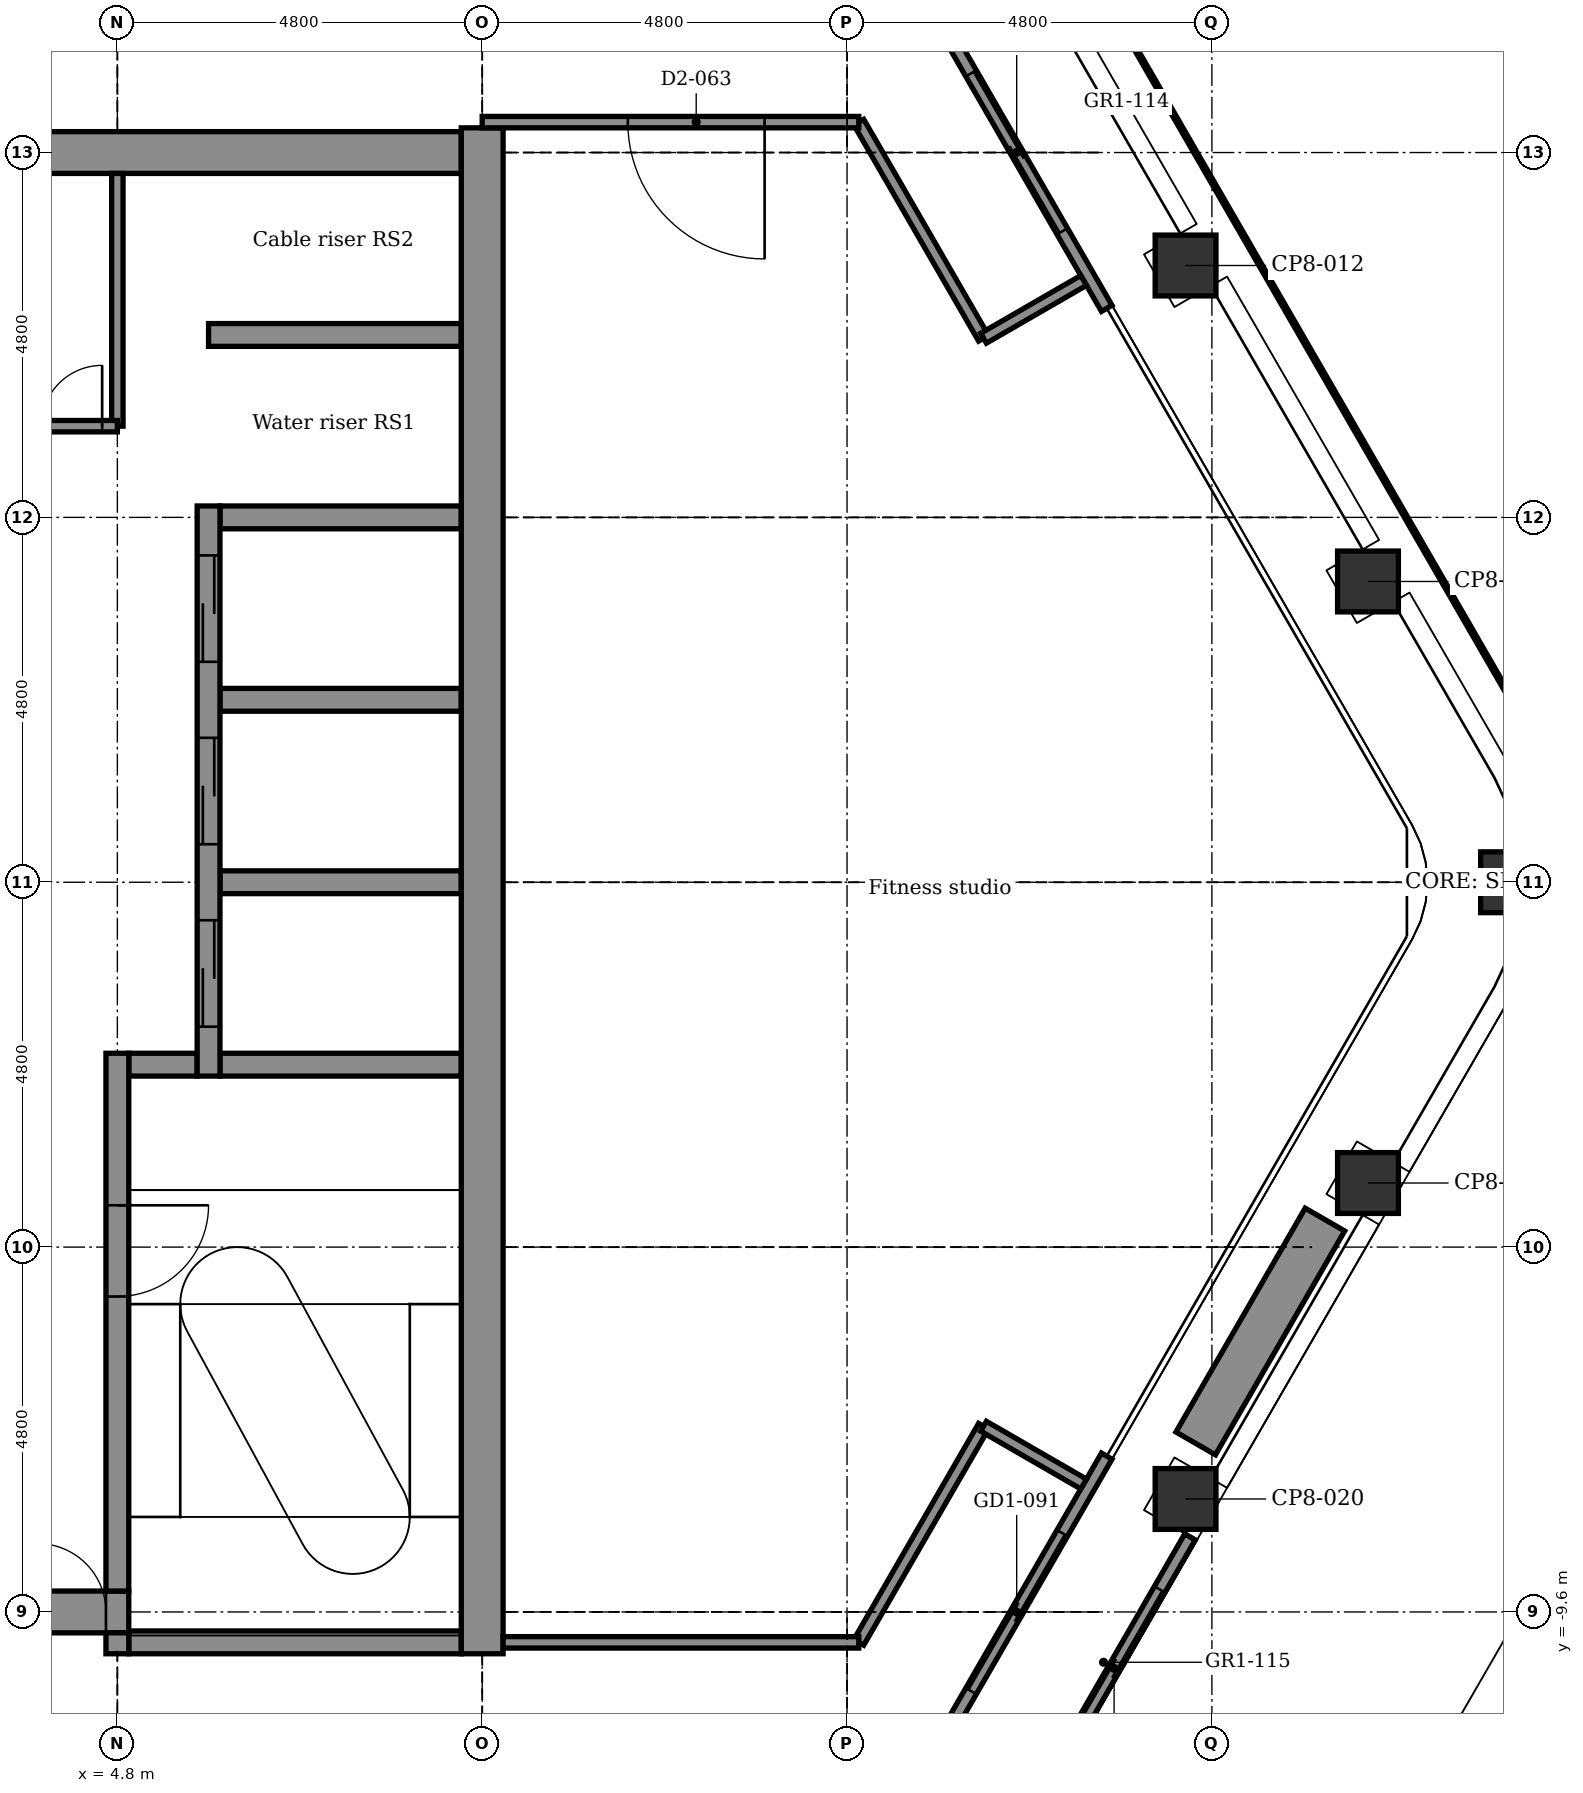
"""IFC4 building model, lengths in metres.
Left out: names, types, materials, properties, quantities, classifications, styles, units other than length and angle.
Written with IfcOpenShell. Run it as: python <this file> out.ifc"""

import sys

from ifc_helpers import new_model, si_unit, direction, frame, frame_2d, origin, origin_2d, place, context, subcontext, project, spatial, rectangle, extrude, element, fill, save


model = new_model("IFC4")
c1 = context("Model", 3, precision=1e-05, world=origin(), true_north=direction((0.0, 1.0)))
c2 = subcontext(c1, "Body", "Model", "MODEL_VIEW")
j1 = project(units=[si_unit("LENGTHUNIT", "METRE"), si_unit("PLANEANGLEUNIT", "RADIAN")], contexts=[c1])
p1 = place(None, origin())
s1 = spatial("IfcSite", under=j1, at=p1, CompositionType="ELEMENT")
p2 = place(p1, origin())
s2 = spatial("IfcBuilding", under=s1, at=p2, CompositionType="ELEMENT")
p3 = place(p2, frame((0.0, 0.0, 222.8)))
s3 = spatial("IfcBuildingStorey", under=s2, at=p3, CompositionType="ELEMENT", Elevation=222.8)
for number, where, z_axis, x_axis in (
    (1, (18.854, 8.114, -0.15), (0.0, 0.0, 1.0), (0.866, 0.5, 0.0)),
    (2, (21.254, 3.957, -0.15), (0.0, 0.0, 1.0), (0.866, 0.5, 0.0)),
    (3, (23.136, 0.0, -0.15), (0.0, 0.0, 1.0), (1.0, 0.0, 0.0)),
    (4, (21.254, -3.957, -0.15), (0.0, 0.0, 1.0), (0.5, 0.866, 0.0)),
    (5, (18.854, -8.114, -0.15), (0.0, 0.0, 1.0), (0.5, 0.866, 0.0)),
):
    element("IfcColumn", number, at=place(p3, frame(where, z_axis=z_axis, x_axis=x_axis)), inside=s3, PredefinedType="COLUMN", context=c2, shape_type="SweptSolid", body=[
        extrude(rectangle(XDim=0.8, YDim=0.8, at=origin_2d()), origin(), (0.0, 0.0, 1.0), 3.9),
    ])
p4 = place(p3, frame((4.95, -10.0, -0.15), z_axis=(0.0, 0.0, 1.0), x_axis=(1.0, 0.0, 0.0)))
e6 = element("IfcWall", 6, at=p4, inside=s3, PredefinedType="STANDARD", context=c2, shape_type="SweptSolid", body=[
    extrude(rectangle(XDim=4.375, YDim=0.3, at=frame_2d((2.188, 0.0))), origin(), (0.0, 0.0, 1.0), 3.9),
])
p5 = place(p3, frame((-5.25, -9.6, -0.15), z_axis=(0.0, 0.0, 1.0), x_axis=(1.0, 0.0, 0.0)))
e7 = element("IfcWall", 7, at=p5, inside=s3, PredefinedType="SHEAR", context=c2, shape_type="SweptSolid", body=[
    extrude(rectangle(XDim=10.2, YDim=0.55, at=frame_2d((5.1, 0.0))), origin(), (0.0, 0.0, 1.0), 3.9),
])
p6 = place(p5, frame((9.0, 0.0, 0.15)))
e8 = element("IfcOpeningElement", 8, at=p6, cuts=e7, PredefinedType="OPENING", context=c2, shape_type="SweptSolid", body=[
    extrude(rectangle(XDim=0.9, YDim=2.1, at=frame_2d((0.45, 1.05))), frame((0.0, 0.285, 0.0), z_axis=(0.0, -1.0, 0.0), x_axis=(1.0, 0.0, 0.0)), (0.0, 0.0, 1.0), 0.57),
])
p7 = place(p3, frame((4.95, -2.4, -0.15), z_axis=(0.0, 0.0, 1.0), x_axis=(1.0, 0.0, 0.0)))
e9 = element("IfcWall", 9, at=p7, inside=s3, PredefinedType="STANDARD", context=c2, shape_type="SweptSolid", body=[
    extrude(rectangle(XDim=0.9, YDim=0.3, at=frame_2d((0.45, 0.0))), origin(), (0.0, 0.0, 1.0), 3.9),
])
for number, where, z_axis, x_axis in (
    (10, (6.15, -2.4, -0.15), (0.0, 0.0, 1.0), (1.0, 0.0, 0.0)),
    (11, (6.15, 0.0, -0.15), (0.0, 0.0, 1.0), (1.0, 0.0, 0.0)),
    (12, (6.15, 2.4, -0.15), (0.0, 0.0, 1.0), (1.0, 0.0, 0.0)),
    (13, (6.15, 4.8, -0.15), (0.0, 0.0, 1.0), (1.0, 0.0, 0.0)),
):
    element("IfcWall", number, at=place(p3, frame(where, z_axis=z_axis, x_axis=x_axis)), inside=s3, PredefinedType="STANDARD", context=c2, shape_type="SweptSolid", body=[
        extrude(rectangle(XDim=3.175, YDim=0.3, at=frame_2d((1.587, 0.0))), origin(), (0.0, 0.0, 1.0), 3.9),
    ])
p8 = place(p3, frame((6.0, 7.2, -0.15), z_axis=(0.0, 0.0, 1.0), x_axis=(1.0, 0.0, 0.0)))
e14 = element("IfcWall", 14, at=p8, inside=s3, PredefinedType="STANDARD", context=c2, shape_type="SweptSolid", body=[
    extrude(rectangle(XDim=3.325, YDim=0.3, at=frame_2d((1.663, 0.0))), origin(), (0.0, 0.0, 1.0), 3.9),
])
p9 = place(p3, frame((-5.25, 9.6, -0.15), z_axis=(0.0, 0.0, 1.0), x_axis=(1.0, 0.0, 0.0)))
e15 = element("IfcWall", 15, at=p9, inside=s3, PredefinedType="SHEAR", context=c2, shape_type="SweptSolid", body=[
    extrude(rectangle(XDim=14.575, YDim=0.55, at=frame_2d((7.288, 0.0))), origin(), (0.0, 0.0, 1.0), 3.9),
])
p10 = place(p9, frame((0.6, 0.0, 0.15)))
e16 = element("IfcOpeningElement", 16, at=p10, cuts=e15, PredefinedType="OPENING", context=c2, shape_type="SweptSolid", body=[
    extrude(rectangle(XDim=0.9, YDim=2.1, at=frame_2d((0.45, 1.05))), frame((0.0, 0.285, 0.0), z_axis=(0.0, -1.0, 0.0), x_axis=(1.0, 0.0, 0.0)), (0.0, 0.0, 1.0), 0.57),
])
p11 = place(p3, frame((4.8, -10.15, -0.15), z_axis=(0.0, 0.0, 1.0), x_axis=(0.0, 1.0, 0.0)))
e17 = element("IfcWall", 17, at=p11, inside=s3, PredefinedType="STANDARD", context=c2, shape_type="SweptSolid", body=[
    extrude(rectangle(XDim=0.275, YDim=0.3, at=frame_2d((0.137, 0.0))), origin(), (0.0, 0.0, 1.0), 3.9),
])
p12 = place(p3, frame((4.8, -9.325, -0.15), z_axis=(0.0, 0.0, 1.0), x_axis=(0.0, 1.0, 0.0)))
e18 = element("IfcWall", 18, at=p12, inside=s3, PredefinedType="STANDARD", context=c2, shape_type="SweptSolid", body=[
    extrude(rectangle(XDim=7.075, YDim=0.3, at=frame_2d((3.538, 0.0))), origin(), (0.0, 0.0, 1.0), 3.9),
])
p13 = place(p12, frame((3.875, 0.0, 0.15)))
e19 = element("IfcOpeningElement", 19, at=p13, cuts=e18, PredefinedType="OPENING", context=c2, shape_type="SweptSolid", body=[
    extrude(rectangle(XDim=1.2, YDim=2.1, at=frame_2d((0.6, 1.05))), frame((0.0, 0.16, 0.0), z_axis=(0.0, -1.0, 0.0), x_axis=(1.0, 0.0, 0.0)), (0.0, 0.0, 1.0), 0.32),
])
p14 = place(p3, frame((6.0, -2.55, -0.15), z_axis=(0.0, 0.0, 1.0), x_axis=(0.0, 1.0, 0.0)))
e20 = element("IfcWall", 20, at=p14, inside=s3, PredefinedType="STANDARD", context=c2, shape_type="SweptSolid", body=[
    extrude(rectangle(XDim=7.5, YDim=0.3, at=frame_2d((3.75, 0.0))), origin(), (0.0, 0.0, 1.0), 3.9),
])
p15 = place(p14, frame((0.65, 0.0, 0.15)))
e21 = element("IfcOpeningElement", 21, at=p15, cuts=e20, PredefinedType="OPENING", context=c2, shape_type="SweptSolid", body=[
    extrude(rectangle(XDim=1.4, YDim=2.1, at=frame_2d((0.7, 1.05))), frame((0.0, 0.16, 0.0), z_axis=(0.0, -1.0, 0.0), x_axis=(1.0, 0.0, 0.0)), (0.0, 0.0, 1.0), 0.32),
])
p16 = place(p14, frame((3.05, 0.0, 0.15)))
e22 = element("IfcOpeningElement", 22, at=p16, cuts=e20, PredefinedType="OPENING", context=c2, shape_type="SweptSolid", body=[
    extrude(rectangle(XDim=1.4, YDim=2.1, at=frame_2d((0.7, 1.05))), frame((0.0, 0.16, 0.0), z_axis=(0.0, -1.0, 0.0), x_axis=(1.0, 0.0, 0.0)), (0.0, 0.0, 1.0), 0.32),
])
p17 = place(p14, frame((5.45, 0.0, 0.15)))
e23 = element("IfcOpeningElement", 23, at=p17, cuts=e20, PredefinedType="OPENING", context=c2, shape_type="SweptSolid", body=[
    extrude(rectangle(XDim=1.4, YDim=2.1, at=frame_2d((0.7, 1.05))), frame((0.0, 0.16, 0.0), z_axis=(0.0, -1.0, 0.0), x_axis=(1.0, 0.0, 0.0)), (0.0, 0.0, 1.0), 0.32),
])
p18 = place(p3, frame((9.6, -10.15, -0.15), z_axis=(0.0, 0.0, 1.0), x_axis=(0.0, 1.0, 0.0)))
e24 = element("IfcWall", 24, at=p18, inside=s3, PredefinedType="SHEAR", context=c2, shape_type="SweptSolid", body=[
    extrude(rectangle(XDim=20.075, YDim=0.55, at=frame_2d((10.038, 0.0))), origin(), (0.0, 0.0, 1.0), 3.9),
])
p19 = place(p3, frame((15.447, 11.655, 0.0), z_axis=(0.0, 0.0, 1.0), x_axis=(0.499978080042, -0.866038058908, 0.0)))
e25 = element("IfcWall", 25, at=p19, inside=s3, PredefinedType="PARTITIONING", context=c2, shape_type="SweptSolid", body=[
    extrude(rectangle(XDim=4.74, YDim=0.16, at=frame_2d((2.37, 0.0))), origin(), (0.0, 0.0, 1.0), 3.75),
])
p20 = place(p19, frame((1.17, 0.0, 0.0)))
e26 = element("IfcOpeningElement", 26, at=p20, cuts=e25, PredefinedType="OPENING", context=c2, shape_type="SweptSolid", body=[
    extrude(rectangle(XDim=2.4, YDim=2.4, at=frame_2d((1.2, 1.2))), frame((0.0, 0.09, 0.0), z_axis=(0.0, -1.0, 0.0), x_axis=(1.0, 0.0, 0.0)), (0.0, 0.0, 1.0), 0.18),
])
p21 = place(p3, frame((17.817, -7.55, 0.0), z_axis=(0.0, 0.0, 1.0), x_axis=(-0.499978080042, -0.866038058908, 0.0)))
e27 = element("IfcWall", 27, at=p21, inside=s3, PredefinedType="PARTITIONING", context=c2, shape_type="SweptSolid", body=[
    extrude(rectangle(XDim=4.74, YDim=0.16, at=frame_2d((2.37, 0.0))), origin(), (0.0, 0.0, 1.0), 3.75),
])
p22 = place(p21, frame((1.17, 0.0, 0.0)))
e28 = element("IfcOpeningElement", 28, at=p22, cuts=e27, PredefinedType="OPENING", context=c2, shape_type="SweptSolid", body=[
    extrude(rectangle(XDim=2.4, YDim=2.4, at=frame_2d((1.2, 1.2))), frame((0.0, 0.09, 0.0), z_axis=(0.0, -1.0, 0.0), x_axis=(1.0, 0.0, 0.0)), (0.0, 0.0, 1.0), 0.18),
])
p23 = place(p3, frame((20.687, -4.438, 0.0), z_axis=(0.0, 0.0, 1.0), x_axis=(-0.500008388397, -0.866020560687, 0.0)))
e29 = element("IfcWall", 29, at=p23, inside=s3, PredefinedType="USERDEFINED", context=c2, shape_type="SweptSolid", body=[
    extrude(rectangle(XDim=3.4, YDim=0.6, at=frame_2d((1.7, 0.0))), origin(), (0.0, 0.0, 1.0), 0.7),
])
p24 = place(p3, frame((18.912, -8.612, 0.0), z_axis=(0.0, 0.0, 1.0), x_axis=(-0.500029202507, -0.866008543052, 0.0)))
e30 = element("IfcWall", 30, at=p24, inside=s3, PredefinedType="PARTITIONING", context=c2, shape_type="SweptSolid", body=[
    extrude(rectangle(XDim=3.996, YDim=0.16, at=frame_2d((1.998, 0.0))), origin(), (0.0, 0.0, 1.0), 2.85),
])
p25 = place(p24, frame((0.798, 0.0, 0.0)))
e31 = element("IfcOpeningElement", 31, at=p25, cuts=e30, PredefinedType="OPENING", context=c2, shape_type="SweptSolid", body=[
    extrude(rectangle(XDim=2.4, YDim=2.4, at=frame_2d((1.2, 1.2))), frame((0.0, 0.09, 0.0), z_axis=(0.0, -1.0, 0.0), x_axis=(1.0, 0.0, 0.0)), (0.0, 0.0, 1.0), 0.18),
])
p26 = place(p3, frame((4.8, 6.0, 0.0), z_axis=(0.0, 0.0, 1.0), x_axis=(0.0, 1.0, 0.0)))
e32 = element("IfcWall", 32, at=p26, inside=s3, PredefinedType="PARTITIONING", context=c2, shape_type="SweptSolid", body=[
    extrude(rectangle(XDim=3.325, YDim=0.15, at=frame_2d((1.663, 0.0))), origin(), (0.0, 0.0, 1.0), 3.75),
])
for number, where, z_axis, x_axis in (
    (33, (14.555, 10.0, 0.0), (0.0, 0.0, 1.0), (0.5, -0.866, 0.0)),
    (34, (14.555, -10.0, 0.0), (0.0, 0.0, 1.0), (0.5, 0.866, 0.0)),
):
    element("IfcWall", number, at=place(p3, frame(where, z_axis=z_axis, x_axis=x_axis)), inside=s3, PredefinedType="PARTITIONING", context=c2, shape_type="SweptSolid", body=[
        extrude(rectangle(XDim=3.283, YDim=0.15, at=frame_2d((1.642, 0.0))), origin(), (0.0, 0.0, 1.0), 3.75),
    ])
for number, where, z_axis, x_axis in (
    (35, (16.196, -7.157, 0.0), (0.0, 0.0, 1.0), (0.866, -0.5, 0.0)),
    (36, (16.196, 7.157, 0.0), (0.0, 0.0, 1.0), (0.866, 0.5, 0.0)),
):
    element("IfcWall", number, at=place(p3, frame(where, z_axis=z_axis, x_axis=x_axis)), inside=s3, PredefinedType="PARTITIONING", context=c2, shape_type="SweptSolid", body=[
        extrude(rectangle(XDim=1.52, YDim=0.15, at=frame_2d((0.76, 0.0))), origin(), (0.0, 0.0, 1.0), 3.75),
    ])
p27 = place(p3, frame((9.875, -10.0, 0.0), z_axis=(0.0, 0.0, 1.0), x_axis=(1.0, 0.0, 0.0)))
e37 = element("IfcWall", 37, at=p27, inside=s3, PredefinedType="PARTITIONING", context=c2, shape_type="SweptSolid", body=[
    extrude(rectangle(XDim=4.68, YDim=0.15, at=frame_2d((2.34, 0.0))), origin(), (0.0, 0.0, 1.0), 3.75),
])
p28 = place(p3, frame((3.75, 6.0, 0.0), z_axis=(0.0, 0.0, 1.0), x_axis=(1.0, 0.0, 0.0)))
e38 = element("IfcWall", 38, at=p28, inside=s3, PredefinedType="PARTITIONING", context=c2, shape_type="SweptSolid", body=[
    extrude(rectangle(XDim=1.05, YDim=0.15, at=frame_2d((0.525, 0.0))), origin(), (0.0, 0.0, 1.0), 3.75),
])
p29 = place(p28, frame((0.05, 0.0, 0.0)))
e39 = element("IfcOpeningElement", 39, at=p29, cuts=e38, PredefinedType="OPENING", context=c2, shape_type="SweptSolid", body=[
    extrude(rectangle(XDim=0.8, YDim=2.1, at=frame_2d((0.4, 1.05))), frame((0.0, 0.085, 0.0), z_axis=(0.0, -1.0, 0.0), x_axis=(1.0, 0.0, 0.0)), (0.0, 0.0, 1.0), 0.17),
])
p30 = place(p3, frame((9.6, 10.0, 0.0), z_axis=(0.0, 0.0, 1.0), x_axis=(1.0, 0.0, 0.0)))
e40 = element("IfcWall", 40, at=p30, inside=s3, PredefinedType="PARTITIONING", context=c2, shape_type="SweptSolid", body=[
    extrude(rectangle(XDim=4.955, YDim=0.15, at=frame_2d((2.477, 0.0))), origin(), (0.0, 0.0, 1.0), 3.75),
])
p31 = place(p30, frame((1.916, 0.0, 0.0)))
e41 = element("IfcOpeningElement", 41, at=p31, cuts=e40, PredefinedType="OPENING", context=c2, shape_type="SweptSolid", body=[
    extrude(rectangle(XDim=1.8, YDim=2.1, at=frame_2d((0.9, 1.05))), frame((0.0, 0.085, 0.0), z_axis=(0.0, -1.0, 0.0), x_axis=(1.0, 0.0, 0.0)), (0.0, 0.0, 1.0), 0.17),
])
p32 = place(p20, origin())
e42 = element("IfcDoor", 42, at=p32, inside=s3, OperationType="DOUBLE_DOOR_SLIDING", PredefinedType="DOOR", context=c2, shape_type="SweptSolid", body=[
    extrude(rectangle(XDim=2.4, YDim=2.4, at=frame_2d((1.2, 1.2))), frame((0.0, 0.025, 0.0), z_axis=(0.0, -1.0, 0.0), x_axis=(1.0, 0.0, 0.0)), (0.0, 0.0, 1.0), 0.05),
])
fill(e26, e42)
p33 = place(p22, origin())
e43 = element("IfcDoor", 43, at=p33, inside=s3, OperationType="DOUBLE_DOOR_SLIDING", PredefinedType="DOOR", context=c2, shape_type="SweptSolid", body=[
    extrude(rectangle(XDim=2.4, YDim=2.4, at=frame_2d((1.2, 1.2))), frame((0.0, 0.025, 0.0), z_axis=(0.0, -1.0, 0.0), x_axis=(1.0, 0.0, 0.0)), (0.0, 0.0, 1.0), 0.05),
])
fill(e28, e43)
p34 = place(p25, origin())
e44 = element("IfcDoor", 44, at=p34, inside=s3, OperationType="DOUBLE_DOOR_SLIDING", PredefinedType="DOOR", context=c2, shape_type="SweptSolid", body=[
    extrude(rectangle(XDim=2.4, YDim=2.4, at=frame_2d((1.2, 1.2))), frame((0.0, 0.025, 0.0), z_axis=(0.0, -1.0, 0.0), x_axis=(1.0, 0.0, 0.0)), (0.0, 0.0, 1.0), 0.05),
])
fill(e31, e44)
p35 = place(p29, origin())
e45 = element("IfcDoor", 45, at=p35, inside=s3, OperationType="SINGLE_SWING_RIGHT", PredefinedType="DOOR", context=c2, shape_type="SweptSolid", body=[
    extrude(rectangle(XDim=0.8, YDim=2.1, at=frame_2d((0.4, 1.05))), frame((0.0, 0.025, 0.0), z_axis=(0.0, -1.0, 0.0), x_axis=(1.0, 0.0, 0.0)), (0.0, 0.0, 1.0), 0.05),
])
fill(e39, e45)
p36 = place(p31, frame((1.8, 0.0, 0.0), z_axis=(0.0, 0.0, 1.0), x_axis=(-1.0, 0.0, 0.0)))
e46 = element("IfcDoor", 46, at=p36, inside=s3, OperationType="SINGLE_SWING_RIGHT", PredefinedType="DOOR", context=c2, shape_type="SweptSolid", body=[
    extrude(rectangle(XDim=1.8, YDim=2.1, at=frame_2d((0.9, 1.05))), frame((0.0, 0.025, 0.0), z_axis=(0.0, -1.0, 0.0), x_axis=(1.0, 0.0, 0.0)), (0.0, 0.0, 1.0), 0.05),
])
fill(e41, e46)
p37 = place(p15, origin())
e47 = element("IfcDoor", 47, at=p37, inside=s3, OperationType="DOUBLE_DOOR_SLIDING", PredefinedType="DOOR", context=c2, shape_type="SweptSolid", body=[
    extrude(rectangle(XDim=1.4, YDim=2.1, at=frame_2d((0.7, 1.05))), frame((0.0, 0.025, 0.0), z_axis=(0.0, -1.0, 0.0), x_axis=(1.0, 0.0, 0.0)), (0.0, 0.0, 1.0), 0.05),
])
fill(e21, e47)
p38 = place(p16, origin())
e48 = element("IfcDoor", 48, at=p38, inside=s3, OperationType="DOUBLE_DOOR_SLIDING", PredefinedType="DOOR", context=c2, shape_type="SweptSolid", body=[
    extrude(rectangle(XDim=1.4, YDim=2.1, at=frame_2d((0.7, 1.05))), frame((0.0, 0.025, 0.0), z_axis=(0.0, -1.0, 0.0), x_axis=(1.0, 0.0, 0.0)), (0.0, 0.0, 1.0), 0.05),
])
fill(e22, e48)
p39 = place(p17, origin())
e49 = element("IfcDoor", 49, at=p39, inside=s3, OperationType="DOUBLE_DOOR_SLIDING", PredefinedType="DOOR", context=c2, shape_type="SweptSolid", body=[
    extrude(rectangle(XDim=1.4, YDim=2.1, at=frame_2d((0.7, 1.05))), frame((0.0, 0.025, 0.0), z_axis=(0.0, -1.0, 0.0), x_axis=(1.0, 0.0, 0.0)), (0.0, 0.0, 1.0), 0.05),
])
fill(e23, e49)
p40 = place(p13, frame((1.2, 0.0, 0.0), z_axis=(0.0, 0.0, 1.0), x_axis=(-1.0, 0.0, 0.0)))
e50 = element("IfcDoor", 50, at=p40, inside=s3, OperationType="SINGLE_SWING_RIGHT", PredefinedType="DOOR", context=c2, shape_type="SweptSolid", body=[
    extrude(rectangle(XDim=1.2, YDim=2.1, at=frame_2d((0.6, 1.05))), frame((0.0, 0.025, 0.0), z_axis=(0.0, -1.0, 0.0), x_axis=(1.0, 0.0, 0.0)), (0.0, 0.0, 1.0), 0.05),
])
fill(e19, e50)
p41 = place(p6, origin())
e51 = element("IfcDoor", 51, at=p41, inside=s3, OperationType="SINGLE_SWING_LEFT", PredefinedType="DOOR", context=c2, shape_type="SweptSolid", body=[
    extrude(rectangle(XDim=0.9, YDim=2.1, at=frame_2d((0.45, 1.05))), frame((0.0, 0.025, 0.0), z_axis=(0.0, -1.0, 0.0), x_axis=(1.0, 0.0, 0.0)), (0.0, 0.0, 1.0), 0.05),
])
fill(e8, e51)
save(model, sys.argv[1])
